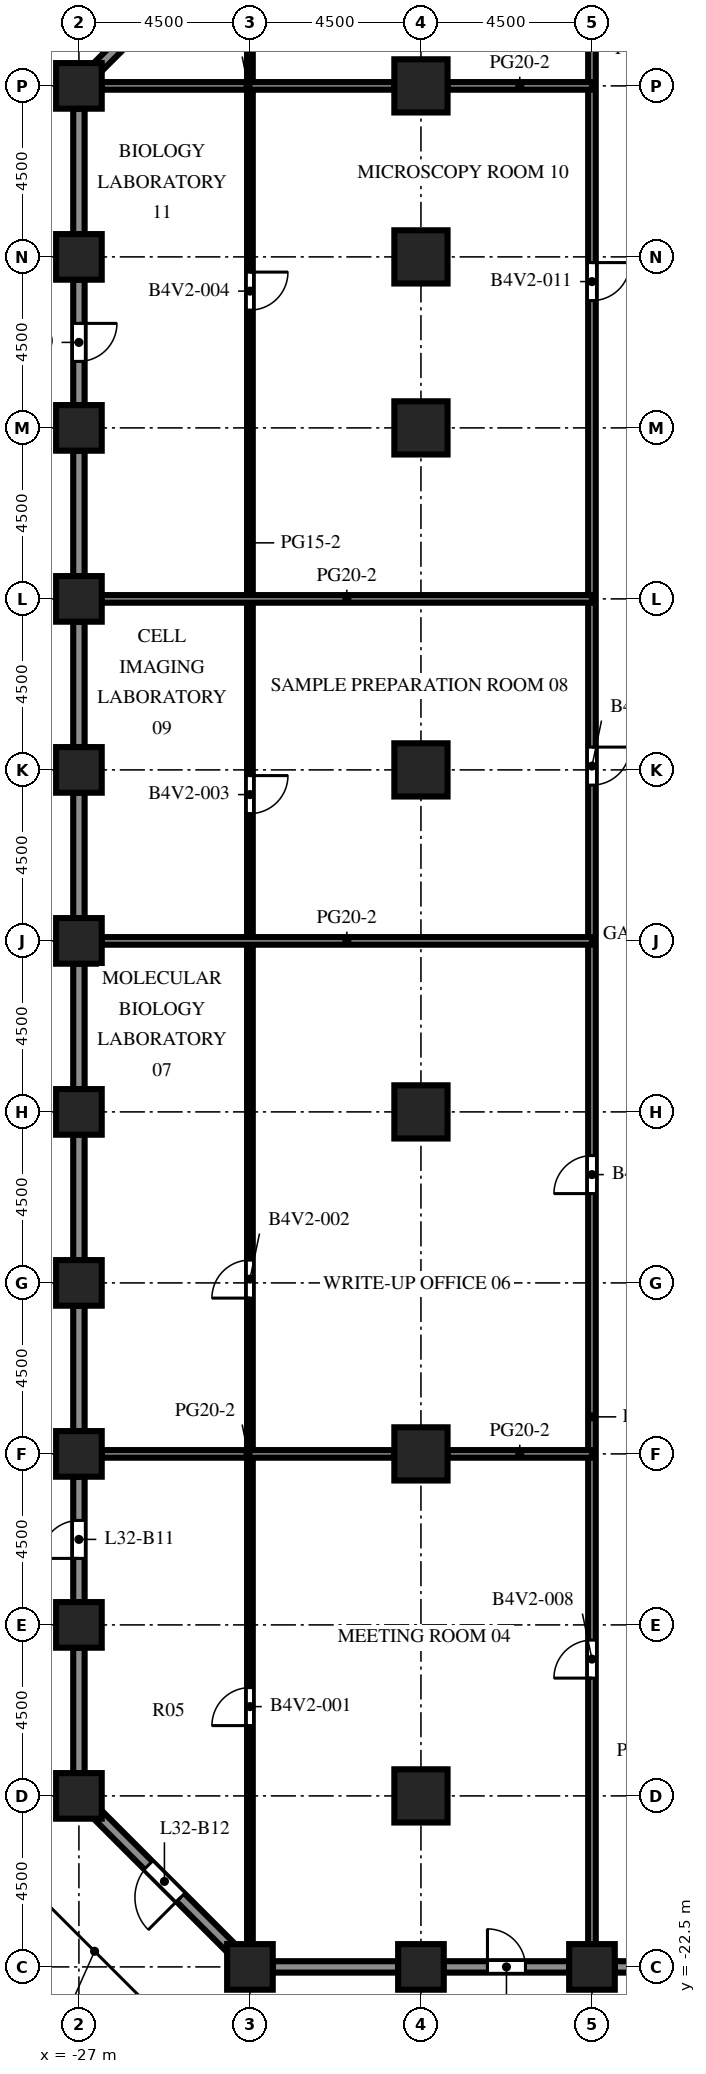
"""IFC4 building model, lengths in metres.
Left out: names, types, materials, properties, quantities, classifications, styles, units other than length and angle.
Written with IfcOpenShell. Run it as: python <this file> out.ifc"""

import sys

from ifc_helpers import new_model, si_unit, direction, frame, frame_2d, origin, origin_2d, place, context, subcontext, project, spatial, rectangle, extrude, element, fill, save


model = new_model("IFC4")
c1 = context("Model", 3, precision=1e-05, world=origin(), true_north=direction((0.0, 1.0)))
c2 = subcontext(c1, "Body", "Model", "MODEL_VIEW")
j1 = project(units=[si_unit("LENGTHUNIT", "METRE"), si_unit("PLANEANGLEUNIT", "RADIAN")], contexts=[c1])
p1 = place(None, origin())
s1 = spatial("IfcSite", under=j1, at=p1, CompositionType="ELEMENT")
p2 = place(p1, origin())
s2 = spatial("IfcBuilding", under=s1, at=p2, CompositionType="ELEMENT")
p3 = place(p2, frame((0.0, 0.0, 141.3)))
s3 = spatial("IfcBuildingStorey", under=s2, at=p3, CompositionType="ELEMENT", Elevation=141.3)
for number, where, z_axis, x_axis in (
    (1, (-27.0, -18.0, 0.0), (0.0, 0.0, 1.0), (1.0, 0.0, 0.0)),
    (2, (-27.0, -13.5, 0.0), (0.0, 0.0, 1.0), (1.0, 0.0, 0.0)),
    (3, (-27.0, -9.0, 0.0), (0.0, 0.0, 1.0), (1.0, 0.0, 0.0)),
    (4, (-27.0, -4.5, 0.0), (0.0, 0.0, 1.0), (1.0, 0.0, 0.0)),
    (5, (-27.0, 0.0, 0.0), (0.0, 0.0, 1.0), (1.0, 0.0, 0.0)),
    (6, (-27.0, 4.5, 0.0), (0.0, 0.0, 1.0), (1.0, 0.0, 0.0)),
    (7, (-27.0, 9.0, 0.0), (0.0, 0.0, 1.0), (1.0, 0.0, 0.0)),
    (8, (-27.0, 13.5, 0.0), (0.0, 0.0, 1.0), (1.0, 0.0, 0.0)),
    (9, (-27.0, 18.0, 0.0), (0.0, 0.0, 1.0), (1.0, 0.0, 0.0)),
    (10, (-27.0, 22.5, 0.0), (0.0, 0.0, 1.0), (1.0, 0.0, 0.0)),
    (11, (-27.0, 27.0, 0.0), (0.0, 0.0, 1.0), (1.0, 0.0, 0.0)),
    (12, (-22.5, -22.5, 0.0), (0.0, 0.0, 1.0), (1.0, 0.0, 0.0)),
    (13, (-18.0, -22.5, 0.0), (0.0, 0.0, 1.0), (1.0, 0.0, 0.0)),
    (14, (-13.5, -22.5, 0.0), (0.0, 0.0, 1.0), (1.0, 0.0, 0.0)),
):
    element("IfcColumn", number, at=place(p3, frame(where, z_axis=z_axis, x_axis=x_axis)), inside=s3, PredefinedType="COLUMN", context=c2, shape_type="SweptSolid", body=[
        extrude(rectangle(XDim=1.2, YDim=1.2, at=origin_2d()), origin(), (0.0, 0.0, 1.0), 4.1),
    ])
for number, where, z_axis, x_axis in (
    (15, (-18.0, -18.0, 0.0), (0.0, 0.0, 1.0), (1.0, 0.0, 0.0)),
    (16, (-18.0, -9.0, 0.0), (0.0, 0.0, 1.0), (1.0, 0.0, 0.0)),
    (17, (-18.0, 0.0, 0.0), (0.0, 0.0, 1.0), (1.0, 0.0, 0.0)),
    (18, (-18.0, 9.0, 0.0), (0.0, 0.0, 1.0), (1.0, 0.0, 0.0)),
    (19, (-18.0, 18.0, 0.0), (0.0, 0.0, 1.0), (1.0, 0.0, 0.0)),
    (20, (-18.0, 22.5, 0.0), (0.0, 0.0, 1.0), (1.0, 0.0, 0.0)),
    (21, (-18.0, 27.0, 0.0), (0.0, 0.0, 1.0), (1.0, 0.0, 0.0)),
):
    element("IfcColumn", number, at=place(p3, frame(where, z_axis=z_axis, x_axis=x_axis)), inside=s3, PredefinedType="COLUMN", context=c2, shape_type="SweptSolid", body=[
        extrude(rectangle(XDim=1.4, YDim=1.4, at=origin_2d()), origin(), (0.0, 0.0, 1.0), 4.1),
    ])
p4 = place(p3, frame((-18.6, -22.5, 0.0), z_axis=(0.0, 0.0, 1.0), x_axis=(-1.0, 0.0, 0.0)))
e22 = element("IfcWall", 22, at=p4, inside=s3, PredefinedType="SOLIDWALL", context=c2, shape_type="SweptSolid", body=[
    extrude(rectangle(XDim=3.3, YDim=0.3, at=frame_2d((1.65, 0.0))), origin(), (0.0, 0.0, 1.0), 2.6),
])
p5 = place(p3, frame((-14.1, -22.5, 0.0), z_axis=(0.0, 0.0, 1.0), x_axis=(-1.0, 0.0, 0.0)))
e23 = element("IfcWall", 23, at=p5, inside=s3, PredefinedType="SOLIDWALL", context=c2, shape_type="SweptSolid", body=[
    extrude(rectangle(XDim=3.3, YDim=0.3, at=frame_2d((1.65, 0.0))), origin(), (0.0, 0.0, 1.0), 2.6),
])
p6 = place(p5, frame((1.15, 0.0, 0.0)))
e24 = element("IfcOpeningElement", 24, at=p6, cuts=e23, PredefinedType="OPENING", context=c2, shape_type="SweptSolid", body=[
    extrude(rectangle(XDim=1.0, YDim=2.2, at=frame_2d((0.5, 1.1))), frame((0.0, 0.16, 0.0), z_axis=(0.0, -1.0, 0.0), x_axis=(1.0, 0.0, 0.0)), (0.0, 0.0, 1.0), 0.32),
])
p7 = place(p3, frame((-9.6, -22.5, 0.0), z_axis=(0.0, 0.0, 1.0), x_axis=(-1.0, 0.0, 0.0)))
e25 = element("IfcWall", 25, at=p7, inside=s3, PredefinedType="SOLIDWALL", context=c2, shape_type="SweptSolid", body=[
    extrude(rectangle(XDim=3.3, YDim=0.3, at=frame_2d((1.65, 0.0))), origin(), (0.0, 0.0, 1.0), 2.6),
])
p8 = place(p3, frame((-26.506, 27.494, 0.0), z_axis=(0.0, 0.0, 1.0), x_axis=(0.707106781187, 0.707106781187, 0.0)))
e26 = element("IfcWall", 26, at=p8, inside=s3, PredefinedType="SOLIDWALL", context=c2, shape_type="SweptSolid", body=[
    extrude(rectangle(XDim=4.967, YDim=0.3, at=frame_2d((2.483, 0.0))), origin(), (0.0, 0.0, 1.0), 2.6),
])
p9 = place(p8, frame((1.884, 0.0, 0.0)))
e27 = element("IfcOpeningElement", 27, at=p9, cuts=e26, PredefinedType="OPENING", context=c2, shape_type="SweptSolid", body=[
    extrude(rectangle(XDim=1.2, YDim=2.2, at=frame_2d((0.6, 1.1))), frame((0.0, 0.16, 0.0), z_axis=(0.0, -1.0, 0.0), x_axis=(1.0, 0.0, 0.0)), (0.0, 0.0, 1.0), 0.32),
])
p10 = place(p3, frame((-27.0, 23.1, 0.0), z_axis=(0.0, 0.0, 1.0), x_axis=(0.0, 1.0, 0.0)))
e28 = element("IfcWall", 28, at=p10, inside=s3, PredefinedType="SOLIDWALL", context=c2, shape_type="SweptSolid", body=[
    extrude(rectangle(XDim=3.3, YDim=0.3, at=frame_2d((1.65, 0.0))), origin(), (0.0, 0.0, 1.0), 2.6),
])
p11 = place(p3, frame((-27.0, 18.6, 0.0), z_axis=(0.0, 0.0, 1.0), x_axis=(0.0, 1.0, 0.0)))
e29 = element("IfcWall", 29, at=p11, inside=s3, PredefinedType="SOLIDWALL", context=c2, shape_type="SweptSolid", body=[
    extrude(rectangle(XDim=3.3, YDim=0.3, at=frame_2d((1.65, 0.0))), origin(), (0.0, 0.0, 1.0), 2.6),
])
p12 = place(p11, frame((1.15, 0.0, 0.0)))
e30 = element("IfcOpeningElement", 30, at=p12, cuts=e29, PredefinedType="OPENING", context=c2, shape_type="SweptSolid", body=[
    extrude(rectangle(XDim=1.0, YDim=2.2, at=frame_2d((0.5, 1.1))), frame((0.0, 0.16, 0.0), z_axis=(0.0, -1.0, 0.0), x_axis=(1.0, 0.0, 0.0)), (0.0, 0.0, 1.0), 0.32),
])
for number, where, z_axis, x_axis in (
    (31, (-27.0, 14.1, 0.0), (0.0, 0.0, 1.0), (0.0, 1.0, 0.0)),
    (32, (-27.0, 9.6, 0.0), (0.0, 0.0, 1.0), (0.0, 1.0, 0.0)),
    (33, (-27.0, 5.1, 0.0), (0.0, 0.0, 1.0), (0.0, 1.0, 0.0)),
    (34, (-27.0, 0.6, 0.0), (0.0, 0.0, 1.0), (0.0, 1.0, 0.0)),
    (35, (-27.0, -3.9, 0.0), (0.0, 0.0, 1.0), (0.0, 1.0, 0.0)),
    (36, (-27.0, -8.4, 0.0), (0.0, 0.0, 1.0), (0.0, 1.0, 0.0)),
):
    element("IfcWall", number, at=place(p3, frame(where, z_axis=z_axis, x_axis=x_axis)), inside=s3, PredefinedType="SOLIDWALL", context=c2, shape_type="SweptSolid", body=[
        extrude(rectangle(XDim=3.3, YDim=0.3, at=frame_2d((1.65, 0.0))), origin(), (0.0, 0.0, 1.0), 2.6),
    ])
p13 = place(p3, frame((-27.0, -12.9, 0.0), z_axis=(0.0, 0.0, 1.0), x_axis=(0.0, 1.0, 0.0)))
e37 = element("IfcWall", 37, at=p13, inside=s3, PredefinedType="SOLIDWALL", context=c2, shape_type="SweptSolid", body=[
    extrude(rectangle(XDim=3.3, YDim=0.3, at=frame_2d((1.65, 0.0))), origin(), (0.0, 0.0, 1.0), 2.6),
])
p14 = place(p13, frame((1.15, 0.0, 0.0)))
e38 = element("IfcOpeningElement", 38, at=p14, cuts=e37, PredefinedType="OPENING", context=c2, shape_type="SweptSolid", body=[
    extrude(rectangle(XDim=1.0, YDim=2.2, at=frame_2d((0.5, 1.1))), frame((0.0, 0.16, 0.0), z_axis=(0.0, -1.0, 0.0), x_axis=(1.0, 0.0, 0.0)), (0.0, 0.0, 1.0), 0.32),
])
p15 = place(p3, frame((-27.0, -17.4, 0.0), z_axis=(0.0, 0.0, 1.0), x_axis=(0.0, 1.0, 0.0)))
e39 = element("IfcWall", 39, at=p15, inside=s3, PredefinedType="SOLIDWALL", context=c2, shape_type="SweptSolid", body=[
    extrude(rectangle(XDim=3.3, YDim=0.3, at=frame_2d((1.65, 0.0))), origin(), (0.0, 0.0, 1.0), 2.6),
])
p16 = place(p3, frame((-22.994, -22.006, 0.0), z_axis=(0.0, 0.0, 1.0), x_axis=(-0.707106781187, 0.707106781187, 0.0)))
e40 = element("IfcWall", 40, at=p16, inside=s3, PredefinedType="SOLIDWALL", context=c2, shape_type="SweptSolid", body=[
    extrude(rectangle(XDim=4.967, YDim=0.3, at=frame_2d((2.483, 0.0))), origin(), (0.0, 0.0, 1.0), 2.6),
])
p17 = place(p16, frame((1.884, 0.0, 0.0)))
e41 = element("IfcOpeningElement", 41, at=p17, cuts=e40, PredefinedType="OPENING", context=c2, shape_type="SweptSolid", body=[
    extrude(rectangle(XDim=1.2, YDim=2.2, at=frame_2d((0.6, 1.1))), frame((0.0, 0.16, 0.0), z_axis=(0.0, -1.0, 0.0), x_axis=(1.0, 0.0, 0.0)), (0.0, 0.0, 1.0), 0.32),
])
p18 = place(p3, frame((-22.5, -21.9, 0.0), z_axis=(0.0, 0.0, 1.0), x_axis=(0.0, 1.0, 0.0)))
e42 = element("IfcWall", 42, at=p18, inside=s3, PredefinedType="PARTITIONING", context=c2, shape_type="SweptSolid", body=[
    extrude(rectangle(XDim=52.8, YDim=0.15, at=frame_2d((26.4, 0.0))), origin(), (0.0, 0.0, 1.0), 3.5),
])
p19 = place(p18, frame((5.75, 0.0, 0.0)))
e43 = element("IfcOpeningElement", 43, at=p19, cuts=e42, PredefinedType="OPENING", context=c2, shape_type="SweptSolid", body=[
    extrude(rectangle(XDim=1.0, YDim=2.1, at=frame_2d((0.5, 1.05))), frame((0.0, 0.085, 0.0), z_axis=(0.0, -1.0, 0.0), x_axis=(1.0, 0.0, 0.0)), (0.0, 0.0, 1.0), 0.17),
])
p20 = place(p18, frame((17.0, 0.0, 0.0)))
e44 = element("IfcOpeningElement", 44, at=p20, cuts=e42, PredefinedType="OPENING", context=c2, shape_type="SweptSolid", body=[
    extrude(rectangle(XDim=1.0, YDim=2.1, at=frame_2d((0.5, 1.05))), frame((0.0, 0.085, 0.0), z_axis=(0.0, -1.0, 0.0), x_axis=(1.0, 0.0, 0.0)), (0.0, 0.0, 1.0), 0.17),
])
p21 = place(p18, frame((29.75, 0.0, 0.0)))
e45 = element("IfcOpeningElement", 45, at=p21, cuts=e42, PredefinedType="OPENING", context=c2, shape_type="SweptSolid", body=[
    extrude(rectangle(XDim=1.0, YDim=2.1, at=frame_2d((0.5, 1.05))), frame((0.0, 0.085, 0.0), z_axis=(0.0, -1.0, 0.0), x_axis=(1.0, 0.0, 0.0)), (0.0, 0.0, 1.0), 0.17),
])
p22 = place(p18, frame((43.0, 0.0, 0.0)))
e46 = element("IfcOpeningElement", 46, at=p22, cuts=e42, PredefinedType="OPENING", context=c2, shape_type="SweptSolid", body=[
    extrude(rectangle(XDim=1.0, YDim=2.1, at=frame_2d((0.5, 1.05))), frame((0.0, 0.085, 0.0), z_axis=(0.0, -1.0, 0.0), x_axis=(1.0, 0.0, 0.0)), (0.0, 0.0, 1.0), 0.17),
])
p23 = place(p18, frame((50.5, 0.0, 0.0)))
e47 = element("IfcOpeningElement", 47, at=p23, cuts=e42, PredefinedType="OPENING", context=c2, shape_type="SweptSolid", body=[
    extrude(rectangle(XDim=1.0, YDim=2.1, at=frame_2d((0.5, 1.05))), frame((0.0, 0.085, 0.0), z_axis=(0.0, -1.0, 0.0), x_axis=(1.0, 0.0, 0.0)), (0.0, 0.0, 1.0), 0.17),
])
p24 = place(p3, frame((-13.5, -21.9, 0.0), z_axis=(0.0, 0.0, 1.0), x_axis=(0.0, 1.0, 0.0)))
e48 = element("IfcWall", 48, at=p24, inside=s3, PredefinedType="PARTITIONING", context=c2, shape_type="SweptSolid", body=[
    extrude(rectangle(XDim=52.8, YDim=0.2, at=frame_2d((26.4, 0.0))), origin(), (0.0, 0.0, 1.0), 3.5),
])
p25 = place(p24, frame((7.0, 0.0, 0.0)))
e49 = element("IfcOpeningElement", 49, at=p25, cuts=e48, PredefinedType="OPENING", context=c2, shape_type="SweptSolid", body=[
    extrude(rectangle(XDim=1.0, YDim=2.1, at=frame_2d((0.5, 1.05))), frame((0.0, 0.11, 0.0), z_axis=(0.0, -1.0, 0.0), x_axis=(1.0, 0.0, 0.0)), (0.0, 0.0, 1.0), 0.22),
])
p26 = place(p24, frame((19.75, 0.0, 0.0)))
e50 = element("IfcOpeningElement", 50, at=p26, cuts=e48, PredefinedType="OPENING", context=c2, shape_type="SweptSolid", body=[
    extrude(rectangle(XDim=1.0, YDim=2.1, at=frame_2d((0.5, 1.05))), frame((0.0, 0.11, 0.0), z_axis=(0.0, -1.0, 0.0), x_axis=(1.0, 0.0, 0.0)), (0.0, 0.0, 1.0), 0.22),
])
p27 = place(p24, frame((30.5, 0.0, 0.0)))
e51 = element("IfcOpeningElement", 51, at=p27, cuts=e48, PredefinedType="OPENING", context=c2, shape_type="SweptSolid", body=[
    extrude(rectangle(XDim=1.0, YDim=2.1, at=frame_2d((0.5, 1.05))), frame((0.0, 0.11, 0.0), z_axis=(0.0, -1.0, 0.0), x_axis=(1.0, 0.0, 0.0)), (0.0, 0.0, 1.0), 0.22),
])
p28 = place(p24, frame((43.25, 0.0, 0.0)))
e52 = element("IfcOpeningElement", 52, at=p28, cuts=e48, PredefinedType="OPENING", context=c2, shape_type="SweptSolid", body=[
    extrude(rectangle(XDim=1.0, YDim=2.1, at=frame_2d((0.5, 1.05))), frame((0.0, 0.11, 0.0), z_axis=(0.0, -1.0, 0.0), x_axis=(1.0, 0.0, 0.0)), (0.0, 0.0, 1.0), 0.22),
])
p29 = place(p24, frame((50.75, 0.0, 0.0)))
e53 = element("IfcOpeningElement", 53, at=p29, cuts=e48, PredefinedType="OPENING", context=c2, shape_type="SweptSolid", body=[
    extrude(rectangle(XDim=1.0, YDim=2.1, at=frame_2d((0.5, 1.05))), frame((0.0, 0.11, 0.0), z_axis=(0.0, -1.0, 0.0), x_axis=(1.0, 0.0, 0.0)), (0.0, 0.0, 1.0), 0.22),
])
p30 = place(p3, frame((-26.4, -9.0, 0.0), z_axis=(0.0, 0.0, 1.0), x_axis=(1.0, 0.0, 0.0)))
e54 = element("IfcWall", 54, at=p30, inside=s3, PredefinedType="PARTITIONING", context=c2, shape_type="SweptSolid", body=[
    extrude(rectangle(XDim=7.7, YDim=0.2, at=frame_2d((3.85, 0.0))), origin(), (0.0, 0.0, 1.0), 3.5),
])
p31 = place(p3, frame((-17.3, -9.0, 0.0), z_axis=(0.0, 0.0, 1.0), x_axis=(1.0, 0.0, 0.0)))
e55 = element("IfcWall", 55, at=p31, inside=s3, PredefinedType="PARTITIONING", context=c2, shape_type="SweptSolid", body=[
    extrude(rectangle(XDim=3.8, YDim=0.2, at=frame_2d((1.9, 0.0))), origin(), (0.0, 0.0, 1.0), 3.5),
])
for number, where, z_axis, x_axis in (
    (56, (-26.4, 4.5, 0.0), (0.0, 0.0, 1.0), (1.0, 0.0, 0.0)),
    (57, (-26.4, 13.5, 0.0), (0.0, 0.0, 1.0), (1.0, 0.0, 0.0)),
):
    element("IfcWall", number, at=place(p3, frame(where, z_axis=z_axis, x_axis=x_axis)), inside=s3, PredefinedType="PARTITIONING", context=c2, shape_type="SweptSolid", body=[
        extrude(rectangle(XDim=12.9, YDim=0.2, at=frame_2d((6.45, 0.0))), origin(), (0.0, 0.0, 1.0), 3.5),
    ])
p32 = place(p3, frame((-26.4, 27.0, 0.0), z_axis=(0.0, 0.0, 1.0), x_axis=(1.0, 0.0, 0.0)))
e58 = element("IfcWall", 58, at=p32, inside=s3, PredefinedType="PARTITIONING", context=c2, shape_type="SweptSolid", body=[
    extrude(rectangle(XDim=7.7, YDim=0.2, at=frame_2d((3.85, 0.0))), origin(), (0.0, 0.0, 1.0), 3.5),
])
p33 = place(p3, frame((-17.3, 27.0, 0.0), z_axis=(0.0, 0.0, 1.0), x_axis=(1.0, 0.0, 0.0)))
e59 = element("IfcWall", 59, at=p33, inside=s3, PredefinedType="PARTITIONING", context=c2, shape_type="SweptSolid", body=[
    extrude(rectangle(XDim=3.8, YDim=0.2, at=frame_2d((1.9, 0.0))), origin(), (0.0, 0.0, 1.0), 3.5),
])
p34 = place(p6, origin())
e60 = element("IfcDoor", 60, at=p34, inside=s3, OperationType="SINGLE_SWING_RIGHT", PredefinedType="DOOR", context=c2, shape_type="SweptSolid", body=[
    extrude(rectangle(XDim=1.0, YDim=2.2, at=frame_2d((0.5, 1.1))), frame((0.0, 0.025, 0.0), z_axis=(0.0, -1.0, 0.0), x_axis=(1.0, 0.0, 0.0)), (0.0, 0.0, 1.0), 0.05),
])
fill(e24, e60)
p35 = place(p12, origin())
e61 = element("IfcDoor", 61, at=p35, inside=s3, OperationType="SINGLE_SWING_RIGHT", PredefinedType="DOOR", context=c2, shape_type="SweptSolid", body=[
    extrude(rectangle(XDim=1.0, YDim=2.2, at=frame_2d((0.5, 1.1))), frame((0.0, 0.025, 0.0), z_axis=(0.0, -1.0, 0.0), x_axis=(1.0, 0.0, 0.0)), (0.0, 0.0, 1.0), 0.05),
])
fill(e30, e61)
p36 = place(p14, origin())
e62 = element("IfcDoor", 62, at=p36, inside=s3, OperationType="SINGLE_SWING_LEFT", PredefinedType="DOOR", context=c2, shape_type="SweptSolid", body=[
    extrude(rectangle(XDim=1.0, YDim=2.2, at=frame_2d((0.5, 1.1))), frame((0.0, 0.025, 0.0), z_axis=(0.0, -1.0, 0.0), x_axis=(1.0, 0.0, 0.0)), (0.0, 0.0, 1.0), 0.05),
])
fill(e38, e62)
p37 = place(p17, origin())
e63 = element("IfcDoor", 63, at=p37, inside=s3, OperationType="SINGLE_SWING_LEFT", PredefinedType="DOOR", context=c2, shape_type="SweptSolid", body=[
    extrude(rectangle(XDim=1.2, YDim=2.2, at=frame_2d((0.6, 1.1))), frame((0.0, 0.025, 0.0), z_axis=(0.0, -1.0, 0.0), x_axis=(1.0, 0.0, 0.0)), (0.0, 0.0, 1.0), 0.05),
])
fill(e41, e63)
p38 = place(p19, origin())
e64 = element("IfcDoor", 64, at=p38, inside=s3, OperationType="SINGLE_SWING_LEFT", PredefinedType="DOOR", context=c2, shape_type="SweptSolid", body=[
    extrude(rectangle(XDim=1.0, YDim=2.1, at=frame_2d((0.5, 1.05))), frame((0.0, 0.025, 0.0), z_axis=(0.0, -1.0, 0.0), x_axis=(1.0, 0.0, 0.0)), (0.0, 0.0, 1.0), 0.05),
])
fill(e43, e64)
p39 = place(p20, origin())
e65 = element("IfcDoor", 65, at=p39, inside=s3, OperationType="SINGLE_SWING_LEFT", PredefinedType="DOOR", context=c2, shape_type="SweptSolid", body=[
    extrude(rectangle(XDim=1.0, YDim=2.1, at=frame_2d((0.5, 1.05))), frame((0.0, 0.025, 0.0), z_axis=(0.0, -1.0, 0.0), x_axis=(1.0, 0.0, 0.0)), (0.0, 0.0, 1.0), 0.05),
])
fill(e44, e65)
p40 = place(p21, origin())
e66 = element("IfcDoor", 66, at=p40, inside=s3, OperationType="SINGLE_SWING_RIGHT", PredefinedType="DOOR", context=c2, shape_type="SweptSolid", body=[
    extrude(rectangle(XDim=1.0, YDim=2.1, at=frame_2d((0.5, 1.05))), frame((0.0, 0.025, 0.0), z_axis=(0.0, -1.0, 0.0), x_axis=(1.0, 0.0, 0.0)), (0.0, 0.0, 1.0), 0.05),
])
fill(e45, e66)
p41 = place(p22, origin())
e67 = element("IfcDoor", 67, at=p41, inside=s3, OperationType="SINGLE_SWING_RIGHT", PredefinedType="DOOR", context=c2, shape_type="SweptSolid", body=[
    extrude(rectangle(XDim=1.0, YDim=2.1, at=frame_2d((0.5, 1.05))), frame((0.0, 0.025, 0.0), z_axis=(0.0, -1.0, 0.0), x_axis=(1.0, 0.0, 0.0)), (0.0, 0.0, 1.0), 0.05),
])
fill(e46, e67)
p42 = place(p25, origin())
e68 = element("IfcDoor", 68, at=p42, inside=s3, OperationType="SINGLE_SWING_LEFT", PredefinedType="DOOR", context=c2, shape_type="SweptSolid", body=[
    extrude(rectangle(XDim=1.0, YDim=2.1, at=frame_2d((0.5, 1.05))), frame((0.0, 0.025, 0.0), z_axis=(0.0, -1.0, 0.0), x_axis=(1.0, 0.0, 0.0)), (0.0, 0.0, 1.0), 0.05),
])
fill(e49, e68)
p43 = place(p26, origin())
e69 = element("IfcDoor", 69, at=p43, inside=s3, OperationType="SINGLE_SWING_LEFT", PredefinedType="DOOR", context=c2, shape_type="SweptSolid", body=[
    extrude(rectangle(XDim=1.0, YDim=2.1, at=frame_2d((0.5, 1.05))), frame((0.0, 0.025, 0.0), z_axis=(0.0, -1.0, 0.0), x_axis=(1.0, 0.0, 0.0)), (0.0, 0.0, 1.0), 0.05),
])
fill(e50, e69)
p44 = place(p27, origin())
e70 = element("IfcDoor", 70, at=p44, inside=s3, OperationType="SINGLE_SWING_RIGHT", PredefinedType="DOOR", context=c2, shape_type="SweptSolid", body=[
    extrude(rectangle(XDim=1.0, YDim=2.1, at=frame_2d((0.5, 1.05))), frame((0.0, 0.025, 0.0), z_axis=(0.0, -1.0, 0.0), x_axis=(1.0, 0.0, 0.0)), (0.0, 0.0, 1.0), 0.05),
])
fill(e51, e70)
p45 = place(p28, origin())
e71 = element("IfcDoor", 71, at=p45, inside=s3, OperationType="SINGLE_SWING_RIGHT", PredefinedType="DOOR", context=c2, shape_type="SweptSolid", body=[
    extrude(rectangle(XDim=1.0, YDim=2.1, at=frame_2d((0.5, 1.05))), frame((0.0, 0.025, 0.0), z_axis=(0.0, -1.0, 0.0), x_axis=(1.0, 0.0, 0.0)), (0.0, 0.0, 1.0), 0.05),
])
fill(e52, e71)
save(model, sys.argv[1])
